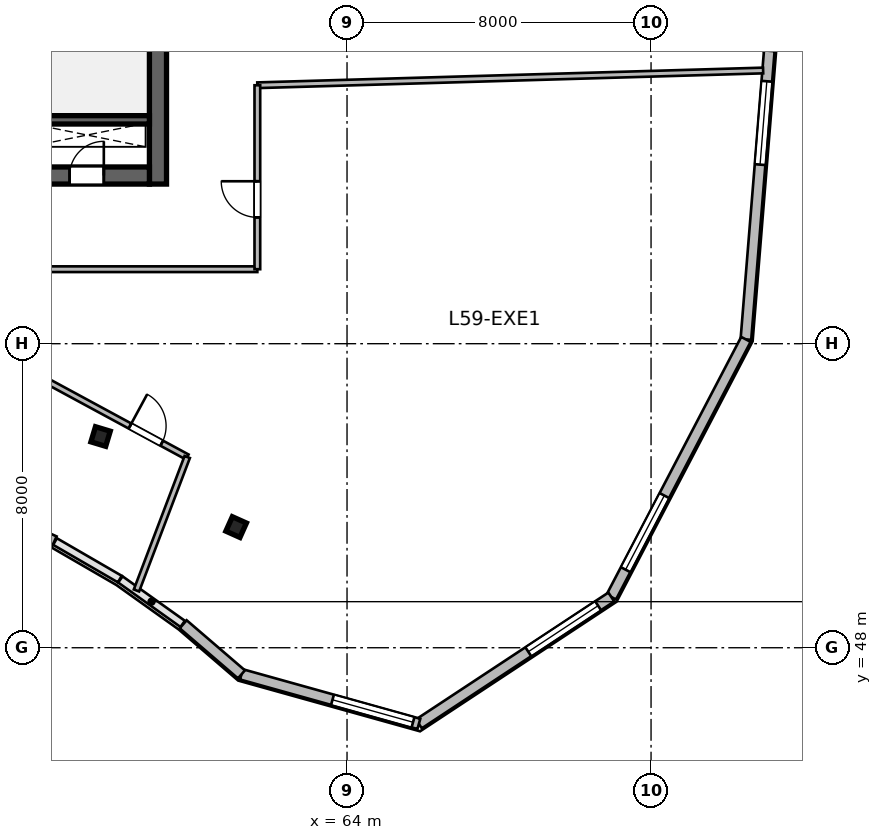
"""IFC4 building model, lengths in metres.
Left out: names, types, materials, properties, quantities, classifications, styles, units other than length and angle.
Written with IfcOpenShell. Run it as: python <this file> out.ifc"""

import sys

from ifc_helpers import new_model, si_unit, direction, frame, frame_2d, origin, origin_2d, place, context, subcontext, project, spatial, rectangle, i_section, extrude, source, transform, mapped, element, fill, save


model = new_model("IFC4")
c1 = context("Model", 3, precision=1e-05, world=origin(), true_north=direction((0.0, 1.0)))
c2 = subcontext(c1, "Body", "Model", "MODEL_VIEW")
j1 = project(units=[si_unit("LENGTHUNIT", "METRE"), si_unit("PLANEANGLEUNIT", "RADIAN")], contexts=[c1])
p1 = place(None, origin())
s1 = spatial("IfcSite", under=j1, at=p1, CompositionType="ELEMENT")
p2 = place(p1, origin())
s2 = spatial("IfcBuilding", under=s1, at=p2, CompositionType="ELEMENT")
p3 = place(p2, frame((0.0, 0.0, 243.0)))
s3 = spatial("IfcBuildingStorey", under=s2, at=p3, CompositionType="ELEMENT", Elevation=243.0)
m1 = source(origin(), c2, "Body", "SweptSolid", [
    extrude(rectangle(XDim=12.0, YDim=0.45, at=frame_2d((6.0, 0.0))), origin(), (0.0, 0.0, 1.0), 3.9),
])
p4 = place(p3, frame((59.025, 60.2, 0.0), z_axis=(0.0, 0.0, 1.0), x_axis=(0.0, 1.0, 0.0)))
e1 = element("IfcWall", 1, at=p4, inside=s3, PredefinedType="SHEAR", context=c2, shape_type="MappedRepresentation", body=[
    mapped(m1, transform((0.0, 0.0, 0.0), scale=1.0)),
])
m2 = source(origin(), c2, "Body", "SweptSolid", [
    extrude(rectangle(XDim=21.6, YDim=0.45, at=frame_2d((10.8, 0.0))), origin(), (0.0, 0.0, 1.0), 3.9),
])
p5 = place(p3, frame((37.2, 60.425, 0.0), z_axis=(0.0, 0.0, 1.0), x_axis=(1.0, 0.0, 0.0)))
e2 = element("IfcWall", 2, at=p5, inside=s3, PredefinedType="SHEAR", context=c2, shape_type="MappedRepresentation", body=[
    mapped(m2, transform((0.0, 0.0, 0.0), scale=1.0)),
])
p6 = place(p5, frame((1.1, 0.0, 0.0)))
e3 = element("IfcOpeningElement", 3, at=p6, cuts=e2, PredefinedType="OPENING", context=c2, shape_type="SweptSolid", body=[
    extrude(rectangle(XDim=1.15, YDim=2.15, at=frame_2d((0.575, 1.075))), frame((0.0, 0.235, 0.0), z_axis=(0.0, -1.0, 0.0), x_axis=(1.0, 0.0, 0.0)), (0.0, 0.0, 1.0), 0.47),
])
p7 = place(p5, frame((19.5, 0.0, 0.0)))
e4 = element("IfcOpeningElement", 4, at=p7, cuts=e2, PredefinedType="OPENING", context=c2, shape_type="SweptSolid", body=[
    extrude(rectangle(XDim=0.9, YDim=2.1, at=frame_2d((0.45, 1.05))), frame((0.0, 0.235, 0.0), z_axis=(0.0, -1.0, 0.0), x_axis=(1.0, 0.0, 0.0)), (0.0, 0.0, 1.0), 0.47),
])
p8 = place(p5, frame((12.02, 0.0, 0.0)))
e5 = element("IfcOpeningElement", 5, at=p8, cuts=e2, PredefinedType="OPENING", context=c2, shape_type="SweptSolid", body=[
    extrude(rectangle(XDim=1.6, YDim=2.15, at=frame_2d((0.8, 1.075))), frame((0.0, 0.235, 0.0), z_axis=(0.0, -1.0, 0.0), x_axis=(1.0, 0.0, 0.0)), (0.0, 0.0, 1.0), 0.47),
])
m3 = source(origin(), c2, "Body", "SweptSolid", [
    extrude(rectangle(XDim=3.27, YDim=0.22, at=frame_2d((1.635, 0.0))), origin(), (0.0, 0.0, 1.0), 3.9),
])
p9 = place(p3, frame((55.53, 61.89, 0.0), z_axis=(0.0, 0.0, 1.0), x_axis=(1.0, 0.0, 0.0)))
e6 = element("IfcWall", 6, at=p9, inside=s3, PredefinedType="SHEAR", context=c2, shape_type="MappedRepresentation", body=[
    mapped(m3, transform((0.0, 0.0, 0.0), scale=1.0)),
])
m4 = source(origin(), c2, "Body", "SweptSolid", [
    extrude(i_section(OverallWidth=0.406, OverallDepth=0.416, WebThickness=0.03, FlangeThickness=0.048, at=origin_2d()), origin(), (0.0, 0.0, 1.0), 3.9),
])
for number, where, z_axis, x_axis in (
    (7, (57.515, 53.558, 0.0), (0.0, 0.0, 1.0), (0.289, 0.957, 0.0)),
    (8, (61.082, 51.175, 0.0), (0.0, 0.0, 1.0), (0.409, 0.912, 0.0)),
):
    element("IfcColumn", number, at=place(p3, frame(where, z_axis=z_axis, x_axis=x_axis)), inside=s3, PredefinedType="COLUMN", context=c2, shape_type="MappedRepresentation", body=[
        mapped(m4, transform((0.0, 0.0, 0.0), scale=1.0)),
    ])
m5 = source(origin(), c2, "Body", "SweptSolid", [
    extrude(rectangle(XDim=6.05, YDim=0.28, at=frame_2d((3.025, 0.0))), origin(), (0.0, 0.0, 1.0), 3.65),
])
p10 = place(p3, frame((72.574, 69.198, 0.0), z_axis=(0.0, 0.0, 1.0), x_axis=(0.41942922905, -0.907788037935, 0.0)))
e9 = element("IfcWall", 9, at=p10, inside=s3, PredefinedType="SOLIDWALL", context=c2, shape_type="MappedRepresentation", body=[
    mapped(m5, transform((0.0, 0.0, 0.0), scale=1.0)),
])
p11 = place(p10, frame((3.437, 0.0, 0.95)))
e10 = element("IfcOpeningElement", 10, at=p11, cuts=e9, PredefinedType="OPENING", context=c2, shape_type="SweptSolid", body=[
    extrude(rectangle(XDim=2.2, YDim=2.1, at=frame_2d((1.1, 1.05))), frame((0.0, 0.15, 0.0), z_axis=(0.0, -1.0, 0.0), x_axis=(1.0, 0.0, 0.0)), (0.0, 0.0, 1.0), 0.3),
])
m6 = source(origin(), c2, "Body", "SweptSolid", [
    extrude(rectangle(XDim=7.618, YDim=0.28, at=frame_2d((3.809, 0.0))), origin(), (0.0, 0.0, 1.0), 3.65),
])
p12 = place(p3, frame((75.112, 63.707, 0.0), z_axis=(0.0, 0.0, 1.0), x_axis=(-0.080820171031, -0.996728699273, 0.0)))
e11 = element("IfcWall", 11, at=p12, inside=s3, PredefinedType="SOLIDWALL", context=c2, shape_type="MappedRepresentation", body=[
    mapped(m6, transform((0.0, 0.0, 0.0), scale=1.0)),
])
p13 = place(p12, frame((0.805, 0.0, 0.95)))
e12 = element("IfcOpeningElement", 12, at=p13, cuts=e11, PredefinedType="OPENING", context=c2, shape_type="SweptSolid", body=[
    extrude(rectangle(XDim=2.2, YDim=2.1, at=frame_2d((1.1, 1.05))), frame((0.0, 0.15, 0.0), z_axis=(0.0, -1.0, 0.0), x_axis=(1.0, 0.0, 0.0)), (0.0, 0.0, 1.0), 0.3),
])
m7 = source(origin(), c2, "Body", "SweptSolid", [
    extrude(rectangle(XDim=7.648, YDim=0.28, at=frame_2d((3.824, 0.0))), origin(), (0.0, 0.0, 1.0), 3.65),
])
p14 = place(p3, frame((74.496, 56.113, 0.0), z_axis=(0.0, 0.0, 1.0), x_axis=(-0.463116873665, -0.886297219519, 0.0)))
e13 = element("IfcWall", 13, at=p14, inside=s3, PredefinedType="SOLIDWALL", context=c2, shape_type="MappedRepresentation", body=[
    mapped(m7, transform((0.0, 0.0, 0.0), scale=1.0)),
])
p15 = place(p14, frame((4.636, 0.0, 0.95)))
e14 = element("IfcOpeningElement", 14, at=p15, cuts=e13, PredefinedType="OPENING", context=c2, shape_type="SweptSolid", body=[
    extrude(rectangle(XDim=2.2, YDim=2.1, at=frame_2d((1.1, 1.05))), frame((0.0, 0.15, 0.0), z_axis=(0.0, -1.0, 0.0), x_axis=(1.0, 0.0, 0.0)), (0.0, 0.0, 1.0), 0.3),
])
m8 = source(origin(), c2, "Body", "SweptSolid", [
    extrude(rectangle(XDim=6.065, YDim=0.28, at=frame_2d((3.033, 0.0))), origin(), (0.0, 0.0, 1.0), 3.65),
])
p16 = place(p3, frame((70.954, 49.335, 0.0), z_axis=(0.0, 0.0, 1.0), x_axis=(-0.834857303202, -0.550466423399, 0.0)))
e15 = element("IfcWall", 15, at=p16, inside=s3, PredefinedType="SOLIDWALL", context=c2, shape_type="MappedRepresentation", body=[
    mapped(m8, transform((0.0, 0.0, 0.0), scale=1.0)),
])
p17 = place(p16, frame((0.416, 0.0, 0.95)))
e16 = element("IfcOpeningElement", 16, at=p17, cuts=e15, PredefinedType="OPENING", context=c2, shape_type="SweptSolid", body=[
    extrude(rectangle(XDim=2.2, YDim=2.1, at=frame_2d((1.1, 1.05))), frame((0.0, 0.15, 0.0), z_axis=(0.0, -1.0, 0.0), x_axis=(1.0, 0.0, 0.0)), (0.0, 0.0, 1.0), 0.3),
])
m9 = source(origin(), c2, "Body", "SweptSolid", [
    extrude(rectangle(XDim=4.847, YDim=0.28, at=frame_2d((2.424, 0.0))), origin(), (0.0, 0.0, 1.0), 3.65),
])
p18 = place(p3, frame((65.891, 45.996, 0.0), z_axis=(0.0, 0.0, 1.0), x_axis=(-0.963208430762, 0.268755500238, 0.0)))
e17 = element("IfcWall", 17, at=p18, inside=s3, PredefinedType="SOLIDWALL", context=c2, shape_type="MappedRepresentation", body=[
    mapped(m9, transform((0.0, 0.0, 0.0), scale=1.0)),
])
p19 = place(p18, frame((0.16, 0.0, 0.95)))
e18 = element("IfcOpeningElement", 18, at=p19, cuts=e17, PredefinedType="OPENING", context=c2, shape_type="SweptSolid", body=[
    extrude(rectangle(XDim=2.2, YDim=2.1, at=frame_2d((1.1, 1.05))), frame((0.0, 0.15, 0.0), z_axis=(0.0, -1.0, 0.0), x_axis=(1.0, 0.0, 0.0)), (0.0, 0.0, 1.0), 0.3),
])
m10 = source(origin(), c2, "Body", "SweptSolid", [
    extrude(rectangle(XDim=2.022, YDim=0.28, at=frame_2d((1.011, 0.0))), origin(), (0.0, 0.0, 1.0), 3.65),
])
p20 = place(p3, frame((61.222, 47.299, 0.0), z_axis=(0.0, 0.0, 1.0), x_axis=(-0.758343943716, 0.651854633358, 0.0)))
e19 = element("IfcWall", 19, at=p20, inside=s3, PredefinedType="SOLIDWALL", context=c2, shape_type="MappedRepresentation", body=[
    mapped(m10, transform((0.0, 0.0, 0.0), scale=1.0)),
])
m11 = source(origin(), c2, "Body", "SweptSolid", [
    extrude(rectangle(XDim=1.933, YDim=0.28, at=frame_2d((0.966, 0.0))), origin(), (0.0, 0.0, 1.0), 3.65),
])
p21 = place(p3, frame((56.3, 50.802, 0.0), z_axis=(0.0, 0.0, 1.0), x_axis=(-0.910478916145, 0.413555489936, 0.0)))
e20 = element("IfcWall", 20, at=p21, inside=s3, PredefinedType="SOLIDWALL", context=c2, shape_type="MappedRepresentation", body=[
    mapped(m11, transform((0.0, 0.0, 0.0), scale=1.0)),
])
m12 = source(origin(), c2, "Body", "SweptSolid", [
    extrude(rectangle(XDim=4.775, YDim=0.15, at=frame_2d((2.387, 0.0))), origin(), (0.0, 0.0, 1.0), 3.65),
])
p22 = place(p3, frame((55.596, 55.292, 0.0), z_axis=(0.0, 0.0, 1.0), x_axis=(0.879401686059, -0.476080533688, 0.0)))
e21 = element("IfcWall", 21, at=p22, inside=s3, PredefinedType="PARTITIONING", context=c2, shape_type="MappedRepresentation", body=[
    mapped(m12, transform((0.0, 0.0, 0.0), scale=1.0)),
])
p23 = place(p22, frame((3.062, 0.0, 0.0)))
e22 = element("IfcOpeningElement", 22, at=p23, cuts=e21, PredefinedType="OPENING", context=c2, shape_type="SweptSolid", body=[
    extrude(rectangle(XDim=0.95, YDim=2.1, at=frame_2d((0.475, 1.05))), frame((0.0, 0.085, 0.0), z_axis=(0.0, -1.0, 0.0), x_axis=(1.0, 0.0, 0.0)), (0.0, 0.0, 1.0), 0.17),
])
m13 = source(origin(), c2, "Body", "SweptSolid", [
    extrude(rectangle(XDim=3.757, YDim=0.15, at=frame_2d((1.879, 0.0))), origin(), (0.0, 0.0, 1.0), 3.65),
])
p24 = place(p3, frame((58.459, 49.507, 0.0), z_axis=(0.0, 0.0, 1.0), x_axis=(0.355427833237, 0.93470372598, 0.0)))
e23 = element("IfcWall", 23, at=p24, inside=s3, PredefinedType="PARTITIONING", context=c2, shape_type="MappedRepresentation", body=[
    mapped(m13, transform((0.0, 0.0, 0.0), scale=1.0)),
])
m14 = source(origin(), c2, "Body", "SweptSolid", [
    extrude(rectangle(XDim=12.39, YDim=0.15, at=frame_2d((6.195, 0.0))), origin(), (0.0, 0.0, 1.0), 3.65),
])
p25 = place(p3, frame((49.25, 57.96, 0.0), z_axis=(0.0, 0.0, 1.0), x_axis=(1.0, 0.0, 0.0)))
e24 = element("IfcWall", 24, at=p25, inside=s3, PredefinedType="PARTITIONING", context=c2, shape_type="MappedRepresentation", body=[
    mapped(m14, transform((0.0, 0.0, 0.0), scale=1.0)),
])
m15 = source(origin(), c2, "Body", "SweptSolid", [
    extrude(rectangle(XDim=13.315, YDim=0.15, at=frame_2d((6.657, 0.0))), origin(), (0.0, 0.0, 1.0), 3.65),
])
p26 = place(p3, frame((61.64, 62.8, 0.0), z_axis=(0.0, 0.0, 1.0), x_axis=(0.999574400598, 0.029172207124, 0.0)))
e25 = element("IfcWall", 25, at=p26, inside=s3, PredefinedType="PARTITIONING", context=c2, shape_type="MappedRepresentation", body=[
    mapped(m15, transform((0.0, 0.0, 0.0), scale=1.0)),
])
m16 = source(origin(), c2, "Body", "SweptSolid", [
    extrude(rectangle(XDim=4.84, YDim=0.15, at=frame_2d((2.42, 0.0))), origin(), (0.0, 0.0, 1.0), 3.65),
])
p27 = place(p3, frame((61.64, 57.96, 0.0), z_axis=(0.0, 0.0, 1.0), x_axis=(0.0, 1.0, 0.0)))
e26 = element("IfcWall", 26, at=p27, inside=s3, PredefinedType="PARTITIONING", context=c2, shape_type="MappedRepresentation", body=[
    mapped(m16, transform((0.0, 0.0, 0.0), scale=1.0)),
])
p28 = place(p27, frame((1.364, 0.0, 0.0)))
e27 = element("IfcOpeningElement", 27, at=p28, cuts=e26, PredefinedType="OPENING", context=c2, shape_type="SweptSolid", body=[
    extrude(rectangle(XDim=0.95, YDim=2.1, at=frame_2d((0.475, 1.05))), frame((0.0, 0.085, 0.0), z_axis=(0.0, -1.0, 0.0), x_axis=(1.0, 0.0, 0.0)), (0.0, 0.0, 1.0), 0.17),
])
m17 = source(origin(), c2, "Body", "SweptSolid", [
    extrude(rectangle(XDim=2.2, YDim=2.1, at=frame_2d((1.1, 1.05))), frame((0.0, 0.03, 0.0), z_axis=(0.0, -1.0, 0.0), x_axis=(1.0, 0.0, 0.0)), (0.0, 0.0, 1.0), 0.06),
])
p29 = place(p13, origin())
e28 = element("IfcWindow", 28, at=p29, inside=s3, PartitioningType="TRIPLE_PANEL_VERTICAL", PredefinedType="WINDOW", context=c2, shape_type="MappedRepresentation", body=[
    mapped(m17, transform((0.0, 0.0, 0.0), scale=1.0)),
])
fill(e12, e28)
p30 = place(p15, origin())
e29 = element("IfcWindow", 29, at=p30, inside=s3, PartitioningType="TRIPLE_PANEL_VERTICAL", PredefinedType="WINDOW", context=c2, shape_type="MappedRepresentation", body=[
    mapped(m17, transform((0.0, 0.0, 0.0), scale=1.0)),
])
fill(e14, e29)
p31 = place(p17, origin())
e30 = element("IfcWindow", 30, at=p31, inside=s3, PartitioningType="TRIPLE_PANEL_VERTICAL", PredefinedType="WINDOW", context=c2, shape_type="MappedRepresentation", body=[
    mapped(m17, transform((0.0, 0.0, 0.0), scale=1.0)),
])
fill(e16, e30)
p32 = place(p19, origin())
e31 = element("IfcWindow", 31, at=p32, inside=s3, PartitioningType="TRIPLE_PANEL_VERTICAL", PredefinedType="WINDOW", context=c2, shape_type="MappedRepresentation", body=[
    mapped(m17, transform((0.0, 0.0, 0.0), scale=1.0)),
])
fill(e18, e31)
m18 = source(origin(), c2, "Body", "SweptSolid", [
    extrude(rectangle(XDim=0.9, YDim=2.1, at=frame_2d((0.45, 1.05))), frame((0.0, 0.025, 0.0), z_axis=(0.0, -1.0, 0.0), x_axis=(1.0, 0.0, 0.0)), (0.0, 0.0, 1.0), 0.05),
])
p33 = place(p7, origin())
e32 = element("IfcDoor", 32, at=p33, inside=s3, OperationType="SINGLE_SWING_RIGHT", PredefinedType="DOOR", context=c2, shape_type="MappedRepresentation", body=[
    mapped(m18, transform((0.0, 0.0, 0.0), scale=1.0)),
])
fill(e4, e32)
m19 = source(origin(), c2, "Body", "SweptSolid", [
    extrude(rectangle(XDim=0.95, YDim=2.1, at=frame_2d((0.475, 1.05))), frame((0.0, 0.025, 0.0), z_axis=(0.0, -1.0, 0.0), x_axis=(1.0, 0.0, 0.0)), (0.0, 0.0, 1.0), 0.05),
])
p34 = place(p23, origin())
e33 = element("IfcDoor", 33, at=p34, inside=s3, OperationType="SINGLE_SWING_LEFT", PredefinedType="DOOR", context=c2, shape_type="MappedRepresentation", body=[
    mapped(m19, transform((0.0, 0.0, 0.0), scale=1.0)),
])
fill(e22, e33)
p35 = place(p28, origin())
e34 = element("IfcDoor", 34, at=p35, inside=s3, OperationType="SINGLE_SWING_RIGHT", PredefinedType="DOOR", context=c2, shape_type="MappedRepresentation", body=[
    mapped(m19, transform((0.0, 0.0, 0.0), scale=1.0)),
])
fill(e27, e34)
save(model, sys.argv[1])
